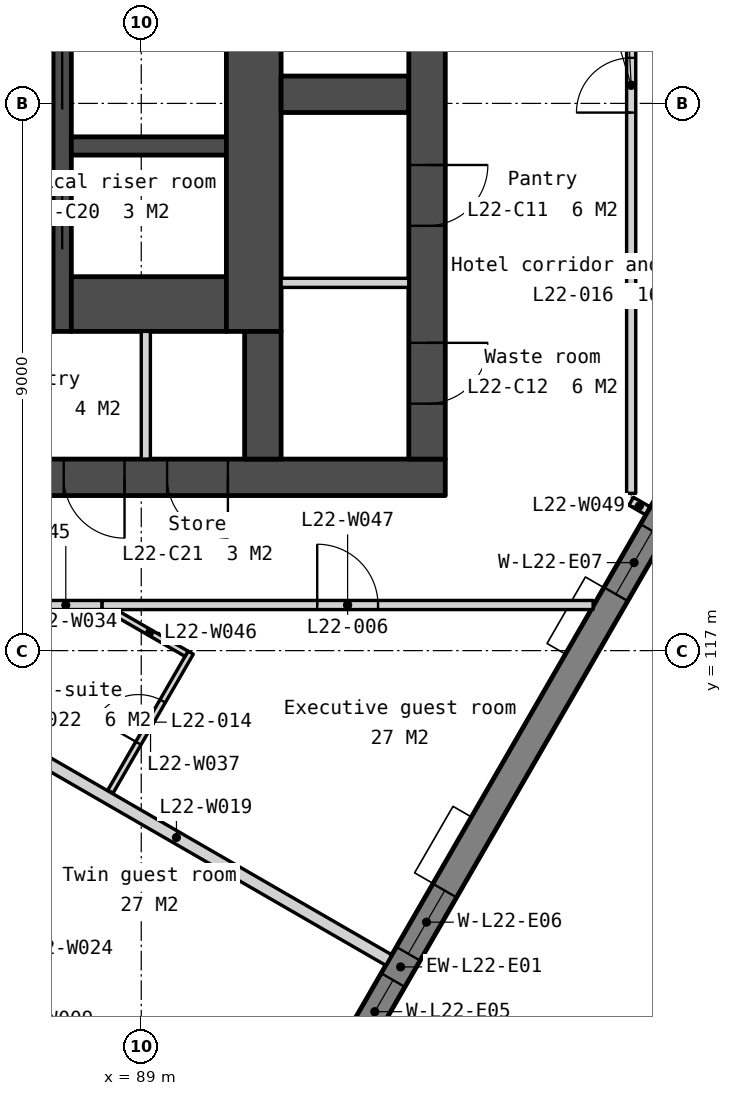
"""IFC4 building model, lengths in metres.
Left out: names, types, materials, properties, quantities, classifications, styles, units other than length and angle.
Written with IfcOpenShell. Run it as: python <this file> out.ifc"""

import sys

from ifc_helpers import new_model, si_unit, direction, frame, frame_2d, origin, place, context, subcontext, project, spatial, polyline, rectangle, outline, extrude, element, fill, save


model = new_model("IFC4")
c1 = context("Model", 3, precision=1e-05, world=origin(), true_north=direction((0.0, 1.0)))
c2 = subcontext(c1, "Body", "Model", "MODEL_VIEW")
j1 = project(units=[si_unit("LENGTHUNIT", "METRE"), si_unit("PLANEANGLEUNIT", "RADIAN")], contexts=[c1])
p1 = place(None, origin())
s1 = spatial("IfcSite", under=j1, at=p1, CompositionType="ELEMENT")
p2 = place(p1, origin())
s2 = spatial("IfcBuilding", under=s1, at=p2, CompositionType="ELEMENT")
p3 = place(p2, frame((0.0, 0.0, 92.3)))
s3 = spatial("IfcBuildingStorey", under=s2, at=p3, CompositionType="ELEMENT", Elevation=92.3)
p4 = place(p3, frame((66.0, 119.85, 0.0), z_axis=(0.0, 0.0, 1.0), x_axis=(1.0, 0.0, 0.0)))
e1 = element("IfcWall", 1, at=p4, inside=s3, PredefinedType="SOLIDWALL", context=c2, shape_type="SweptSolid", body=[
    extrude(rectangle(XDim=28.0, YDim=0.6, at=frame_2d((14.0, 0.0))), origin(), (0.0, 0.0, 1.0), 3.35),
])
p5 = place(p4, frame((6.825, 0.0, 0.0)))
e2 = element("IfcOpeningElement", 2, at=p5, cuts=e1, PredefinedType="OPENING", context=c2, shape_type="SweptSolid", body=[
    extrude(rectangle(XDim=1.8, YDim=2.1, at=frame_2d((0.9, 1.05))), frame((0.0, 0.31, 0.0), z_axis=(0.0, -1.0, 0.0), x_axis=(1.0, 0.0, 0.0)), (0.0, 0.0, 1.0), 0.62),
])
p6 = place(p4, frame((15.85, 0.0, 0.0)))
e3 = element("IfcOpeningElement", 3, at=p6, cuts=e1, PredefinedType="OPENING", context=c2, shape_type="SweptSolid", body=[
    extrude(rectangle(XDim=1.5, YDim=2.1, at=frame_2d((0.75, 1.05))), frame((0.0, 0.31, 0.0), z_axis=(0.0, -1.0, 0.0), x_axis=(1.0, 0.0, 0.0)), (0.0, 0.0, 1.0), 0.62),
])
p7 = place(p4, frame((19.375, 0.0, 0.0)))
e4 = element("IfcOpeningElement", 4, at=p7, cuts=e1, PredefinedType="OPENING", context=c2, shape_type="SweptSolid", body=[
    extrude(rectangle(XDim=1.8, YDim=2.1, at=frame_2d((0.9, 1.05))), frame((0.0, 0.31, 0.0), z_axis=(0.0, -1.0, 0.0), x_axis=(1.0, 0.0, 0.0)), (0.0, 0.0, 1.0), 0.62),
])
p8 = place(p4, frame((4.425, 0.0, 0.0)))
e5 = element("IfcOpeningElement", 5, at=p8, cuts=e1, PredefinedType="OPENING", context=c2, shape_type="SweptSolid", body=[
    extrude(rectangle(XDim=1.0, YDim=2.1, at=frame_2d((0.5, 1.05))), frame((0.0, 0.31, 0.0), z_axis=(0.0, -1.0, 0.0), x_axis=(1.0, 0.0, 0.0)), (0.0, 0.0, 1.0), 0.62),
])
p9 = place(p4, frame((9.925, 0.0, 0.0)))
e6 = element("IfcOpeningElement", 6, at=p9, cuts=e1, PredefinedType="OPENING", context=c2, shape_type="SweptSolid", body=[
    extrude(rectangle(XDim=1.0, YDim=2.1, at=frame_2d((0.5, 1.05))), frame((0.0, 0.31, 0.0), z_axis=(0.0, -1.0, 0.0), x_axis=(1.0, 0.0, 0.0)), (0.0, 0.0, 1.0), 0.62),
])
p10 = place(p4, frame((13.125, 0.0, 0.0)))
e7 = element("IfcOpeningElement", 7, at=p10, cuts=e1, PredefinedType="OPENING", context=c2, shape_type="SweptSolid", body=[
    extrude(rectangle(XDim=1.0, YDim=2.1, at=frame_2d((0.5, 1.05))), frame((0.0, 0.31, 0.0), z_axis=(0.0, -1.0, 0.0), x_axis=(1.0, 0.0, 0.0)), (0.0, 0.0, 1.0), 0.62),
])
p11 = place(p4, frame((21.725, 0.0, 0.0)))
e8 = element("IfcOpeningElement", 8, at=p11, cuts=e1, PredefinedType="OPENING", context=c2, shape_type="SweptSolid", body=[
    extrude(rectangle(XDim=1.0, YDim=2.1, at=frame_2d((0.5, 1.05))), frame((0.0, 0.31, 0.0), z_axis=(0.0, -1.0, 0.0), x_axis=(1.0, 0.0, 0.0)), (0.0, 0.0, 1.0), 0.62),
])
p12 = place(p4, frame((23.425, 0.0, 0.0)))
e9 = element("IfcOpeningElement", 9, at=p12, cuts=e1, PredefinedType="OPENING", context=c2, shape_type="SweptSolid", body=[
    extrude(rectangle(XDim=1.0, YDim=2.1, at=frame_2d((0.5, 1.05))), frame((0.0, 0.31, 0.0), z_axis=(0.0, -1.0, 0.0), x_axis=(1.0, 0.0, 0.0)), (0.0, 0.0, 1.0), 0.62),
])
p13 = place(p3, frame((85.0, 122.7, 0.0), z_axis=(0.0, 0.0, 1.0), x_axis=(1.0, 0.0, 0.0)))
e10 = element("IfcWall", 10, at=p13, inside=s3, PredefinedType="SOLIDWALL", context=c2, shape_type="SweptSolid", body=[
    extrude(rectangle(XDim=2.55, YDim=0.9, at=frame_2d((1.275, 0.0))), origin(), (0.0, 0.0, 1.0), 3.35),
])
p14 = place(p13, frame((0.375, 0.0, 0.0)))
e11 = element("IfcOpeningElement", 11, at=p14, cuts=e10, PredefinedType="OPENING", context=c2, shape_type="SweptSolid", body=[
    extrude(rectangle(XDim=1.8, YDim=2.1, at=frame_2d((0.9, 1.05))), frame((0.0, 0.46, 0.0), z_axis=(0.0, -1.0, 0.0), x_axis=(1.0, 0.0, 0.0)), (0.0, 0.0, 1.0), 0.92),
])
p15 = place(p3, frame((87.7, 133.95, 0.0), z_axis=(0.0, 0.0, 1.0), x_axis=(0.0, -1.0, 0.0)))
e12 = element("IfcWall", 12, at=p15, inside=s3, PredefinedType="SOLIDWALL", context=c2, shape_type="SweptSolid", body=[
    extrude(rectangle(XDim=11.7, YDim=0.3, at=frame_2d((5.85, 0.0))), origin(), (0.0, 0.0, 1.0), 3.35),
])
p16 = place(p15, frame((6.95, 0.0, 0.0)))
e13 = element("IfcOpeningElement", 13, at=p16, cuts=e12, PredefinedType="OPENING", context=c2, shape_type="SweptSolid", body=[
    extrude(rectangle(XDim=1.1, YDim=2.1, at=frame_2d((0.55, 1.05))), frame((0.0, 0.16, 0.0), z_axis=(0.0, -1.0, 0.0), x_axis=(1.0, 0.0, 0.0)), (0.0, 0.0, 1.0), 0.32),
])
p17 = place(p15, frame((5.1, 0.0, 0.0)))
e14 = element("IfcOpeningElement", 14, at=p17, cuts=e12, PredefinedType="OPENING", context=c2, shape_type="SweptSolid", body=[
    extrude(rectangle(XDim=1.0, YDim=2.1, at=frame_2d((0.5, 1.05))), frame((0.0, 0.16, 0.0), z_axis=(0.0, -1.0, 0.0), x_axis=(1.0, 0.0, 0.0)), (0.0, 0.0, 1.0), 0.32),
])
p18 = place(p15, frame((9.25, 0.0, 0.0)))
e15 = element("IfcOpeningElement", 15, at=p18, cuts=e12, PredefinedType="OPENING", context=c2, shape_type="SweptSolid", body=[
    extrude(rectangle(XDim=1.1, YDim=2.1, at=frame_2d((0.55, 1.05))), frame((0.0, 0.16, 0.0), z_axis=(0.0, -1.0, 0.0), x_axis=(1.0, 0.0, 0.0)), (0.0, 0.0, 1.0), 0.32),
])
p19 = place(p3, frame((87.85, 125.3, 0.0), z_axis=(0.0, 0.0, 1.0), x_axis=(1.0, 0.0, 0.0)))
e16 = element("IfcWall", 16, at=p19, inside=s3, PredefinedType="SOLIDWALL", context=c2, shape_type="SweptSolid", body=[
    extrude(rectangle(XDim=2.55, YDim=0.3, at=frame_2d((1.275, 0.0))), origin(), (0.0, 0.0, 1.0), 3.35),
])
p20 = place(p3, frame((87.85, 122.7, 0.0), z_axis=(0.0, 0.0, 1.0), x_axis=(1.0, 0.0, 0.0)))
e17 = element("IfcWall", 17, at=p20, inside=s3, PredefinedType="SOLIDWALL", context=c2, shape_type="SweptSolid", body=[
    extrude(rectangle(XDim=2.55, YDim=0.9, at=frame_2d((1.275, 0.0))), origin(), (0.0, 0.0, 1.0), 3.35),
])
p21 = place(p3, frame((89.075, 122.25, 0.0), z_axis=(0.0, 0.0, 1.0), x_axis=(0.0, -1.0, 0.0)))
e18 = element("IfcWall", 18, at=p21, inside=s3, PredefinedType="PARTITIONING", context=c2, shape_type="SweptSolid", body=[
    extrude(rectangle(XDim=2.1, YDim=0.15, at=frame_2d((1.05, 0.0))), origin(), (0.0, 0.0, 1.0), 3.35),
])
p22 = place(p3, frame((90.85, 133.95, 0.0), z_axis=(0.0, 0.0, 1.0), x_axis=(0.0, -1.0, 0.0)))
e19 = element("IfcWall", 19, at=p22, inside=s3, PredefinedType="SOLIDWALL", context=c2, shape_type="SweptSolid", body=[
    extrude(rectangle(XDim=11.7, YDim=0.9, at=frame_2d((5.85, 0.0))), origin(), (0.0, 0.0, 1.0), 3.35),
])
p23 = place(p3, frame((91.0, 122.25, 0.0), z_axis=(0.0, 0.0, 1.0), x_axis=(0.0, -1.0, 0.0)))
e20 = element("IfcWall", 20, at=p23, inside=s3, PredefinedType="SOLIDWALL", context=c2, shape_type="SweptSolid", body=[
    extrude(rectangle(XDim=2.1, YDim=0.6, at=frame_2d((1.05, 0.0))), origin(), (0.0, 0.0, 1.0), 3.35),
])
p24 = place(p3, frame((91.3, 126.15, 0.0), z_axis=(0.0, 0.0, 1.0), x_axis=(1.0, 0.0, 0.0)))
e21 = element("IfcWall", 21, at=p24, inside=s3, PredefinedType="SOLIDWALL", context=c2, shape_type="SweptSolid", body=[
    extrude(rectangle(XDim=2.1, YDim=0.6, at=frame_2d((1.05, 0.0))), origin(), (0.0, 0.0, 1.0), 3.35),
])
p25 = place(p3, frame((91.3, 123.049, 0.0), z_axis=(0.0, 0.0, 1.0), x_axis=(1.0, 0.0, 0.0)))
e22 = element("IfcWall", 22, at=p25, inside=s3, PredefinedType="PARTITIONING", context=c2, shape_type="SweptSolid", body=[
    extrude(rectangle(XDim=2.1, YDim=0.15, at=frame_2d((1.05, 0.0))), origin(), (0.0, 0.0, 1.0), 3.35),
])
p26 = place(p3, frame((93.7, 133.95, 0.0), z_axis=(0.0, 0.0, 1.0), x_axis=(0.0, -1.0, 0.0)))
e23 = element("IfcWall", 23, at=p26, inside=s3, PredefinedType="SOLIDWALL", context=c2, shape_type="SweptSolid", body=[
    extrude(rectangle(XDim=13.8, YDim=0.6, at=frame_2d((6.9, 0.0))), origin(), (0.0, 0.0, 1.0), 3.35),
])
p27 = place(p26, frame((0.6, 0.0, 0.0)))
e24 = element("IfcOpeningElement", 24, at=p27, cuts=e23, PredefinedType="OPENING", context=c2, shape_type="SweptSolid", body=[
    extrude(rectangle(XDim=1.1, YDim=2.1, at=frame_2d((0.55, 1.05))), frame((0.0, 0.31, 0.0), z_axis=(0.0, -1.0, 0.0), x_axis=(1.0, 0.0, 0.0)), (0.0, 0.0, 1.0), 0.62),
])
p28 = place(p26, frame((8.963, 0.0, 0.0)))
e25 = element("IfcOpeningElement", 25, at=p28, cuts=e23, PredefinedType="OPENING", context=c2, shape_type="SweptSolid", body=[
    extrude(rectangle(XDim=1.0, YDim=2.1, at=frame_2d((0.5, 1.05))), frame((0.0, 0.31, 0.0), z_axis=(0.0, -1.0, 0.0), x_axis=(1.0, 0.0, 0.0)), (0.0, 0.0, 1.0), 0.62),
])
p29 = place(p26, frame((11.888, 0.0, 0.0)))
e26 = element("IfcOpeningElement", 26, at=p29, cuts=e23, PredefinedType="OPENING", context=c2, shape_type="SweptSolid", body=[
    extrude(rectangle(XDim=1.0, YDim=2.1, at=frame_2d((0.5, 1.05))), frame((0.0, 0.31, 0.0), z_axis=(0.0, -1.0, 0.0), x_axis=(1.0, 0.0, 0.0)), (0.0, 0.0, 1.0), 0.62),
])
p30 = place(p3, frame((82.605, 93.333, -0.15), z_axis=(0.0, 0.0, 1.0), x_axis=(0.500000478905, 0.866025127289, 0.0)))
e27 = element("IfcWall", 27, at=p30, inside=s3, PredefinedType="SOLIDWALL", context=c2, shape_type="SweptSolid", body=[
    extrude(outline(polyline([(42.643, 0.0), (42.643, 3.5), (0.0, 3.5), (0.0, 0.0), (42.643, 0.0)])), frame((0.0, 0.225, 0.0), z_axis=(0.0, -1.0, 0.0), x_axis=(1.0, 0.0, 0.0)), (0.0, 0.0, 1.0), 0.45),
])
p31 = place(p30, frame((2.814, 0.0, 1.05)))
e28 = element("IfcOpeningElement", 28, at=p31, cuts=e27, PredefinedType="OPENING", context=c2, shape_type="SweptSolid", body=[
    extrude(rectangle(XDim=1.2, YDim=1.5, at=frame_2d((0.6, 0.75))), frame((0.0, 0.235, 0.0), z_axis=(0.0, -1.0, 0.0), x_axis=(1.0, 0.0, 0.0)), (0.0, 0.0, 1.0), 0.47),
])
p32 = place(p30, frame((4.514, 0.0, 1.05)))
e29 = element("IfcOpeningElement", 29, at=p32, cuts=e27, PredefinedType="OPENING", context=c2, shape_type="SweptSolid", body=[
    extrude(rectangle(XDim=1.2, YDim=1.5, at=frame_2d((0.6, 0.75))), frame((0.0, 0.235, 0.0), z_axis=(0.0, -1.0, 0.0), x_axis=(1.0, 0.0, 0.0)), (0.0, 0.0, 1.0), 0.47),
])
p33 = place(p30, frame((11.343, 0.0, 1.05)))
e30 = element("IfcOpeningElement", 30, at=p33, cuts=e27, PredefinedType="OPENING", context=c2, shape_type="SweptSolid", body=[
    extrude(rectangle(XDim=1.2, YDim=1.5, at=frame_2d((0.6, 0.75))), frame((0.0, 0.235, 0.0), z_axis=(0.0, -1.0, 0.0), x_axis=(1.0, 0.0, 0.0)), (0.0, 0.0, 1.0), 0.47),
])
p34 = place(p30, frame((13.043, 0.0, 1.05)))
e31 = element("IfcOpeningElement", 31, at=p34, cuts=e27, PredefinedType="OPENING", context=c2, shape_type="SweptSolid", body=[
    extrude(rectangle(XDim=1.2, YDim=1.5, at=frame_2d((0.6, 0.75))), frame((0.0, 0.235, 0.0), z_axis=(0.0, -1.0, 0.0), x_axis=(1.0, 0.0, 0.0)), (0.0, 0.0, 1.0), 0.47),
])
p35 = place(p30, frame((19.872, 0.0, 1.05)))
e32 = element("IfcOpeningElement", 32, at=p35, cuts=e27, PredefinedType="OPENING", context=c2, shape_type="SweptSolid", body=[
    extrude(rectangle(XDim=1.2, YDim=1.5, at=frame_2d((0.6, 0.75))), frame((0.0, 0.235, 0.0), z_axis=(0.0, -1.0, 0.0), x_axis=(1.0, 0.0, 0.0)), (0.0, 0.0, 1.0), 0.47),
])
p36 = place(p30, frame((21.572, 0.0, 1.05)))
e33 = element("IfcOpeningElement", 33, at=p36, cuts=e27, PredefinedType="OPENING", context=c2, shape_type="SweptSolid", body=[
    extrude(rectangle(XDim=1.2, YDim=1.5, at=frame_2d((0.6, 0.75))), frame((0.0, 0.235, 0.0), z_axis=(0.0, -1.0, 0.0), x_axis=(1.0, 0.0, 0.0)), (0.0, 0.0, 1.0), 0.47),
])
p37 = place(p30, frame((28.4, 0.0, 1.05)))
e34 = element("IfcOpeningElement", 34, at=p37, cuts=e27, PredefinedType="OPENING", context=c2, shape_type="SweptSolid", body=[
    extrude(rectangle(XDim=1.2, YDim=1.5, at=frame_2d((0.6, 0.75))), frame((0.0, 0.235, 0.0), z_axis=(0.0, -1.0, 0.0), x_axis=(1.0, 0.0, 0.0)), (0.0, 0.0, 1.0), 0.47),
])
p38 = place(p30, frame((30.1, 0.0, 1.05)))
e35 = element("IfcOpeningElement", 35, at=p38, cuts=e27, PredefinedType="OPENING", context=c2, shape_type="SweptSolid", body=[
    extrude(rectangle(XDim=1.2, YDim=1.5, at=frame_2d((0.6, 0.75))), frame((0.0, 0.235, 0.0), z_axis=(0.0, -1.0, 0.0), x_axis=(1.0, 0.0, 0.0)), (0.0, 0.0, 1.0), 0.47),
])
p39 = place(p30, frame((36.929, 0.0, 1.05)))
e36 = element("IfcOpeningElement", 36, at=p39, cuts=e27, PredefinedType="OPENING", context=c2, shape_type="SweptSolid", body=[
    extrude(rectangle(XDim=1.2, YDim=1.5, at=frame_2d((0.6, 0.75))), frame((0.0, 0.235, 0.0), z_axis=(0.0, -1.0, 0.0), x_axis=(1.0, 0.0, 0.0)), (0.0, 0.0, 1.0), 0.47),
])
p40 = place(p30, frame((38.629, 0.0, 1.05)))
e37 = element("IfcOpeningElement", 37, at=p40, cuts=e27, PredefinedType="OPENING", context=c2, shape_type="SweptSolid", body=[
    extrude(rectangle(XDim=1.2, YDim=1.5, at=frame_2d((0.6, 0.75))), frame((0.0, 0.235, 0.0), z_axis=(0.0, -1.0, 0.0), x_axis=(1.0, 0.0, 0.0)), (0.0, 0.0, 1.0), 0.47),
])
p41 = place(p3, frame((83.954, 112.25, 0.0), z_axis=(0.0, 0.0, 1.0), x_axis=(0.866030828432, -0.499990604118, 0.0)))
e38 = element("IfcWall", 38, at=p41, inside=s3, PredefinedType="PARTITIONING", context=c2, shape_type="SweptSolid", body=[
    extrude(rectangle(XDim=8.065, YDim=0.2, at=frame_2d((4.033, 0.0))), origin(), (0.0, 0.0, 1.0), 3.35),
])
p42 = place(p3, frame((86.087, 115.943, 0.0), z_axis=(0.0, 0.0, 1.0), x_axis=(0.866010152247, -0.500026415507, 0.0)))
e39 = element("IfcWall", 39, at=p42, inside=s3, PredefinedType="PARTITIONING", context=c2, shape_type="SweptSolid", body=[
    extrude(rectangle(XDim=8.065, YDim=0.2, at=frame_2d((4.032, 0.0))), origin(), (0.0, 0.0, 1.0), 3.35),
])
p43 = place(p3, frame((88.493, 114.68, 0.0), z_axis=(0.0, 0.0, 1.0), x_axis=(0.499938597367, 0.866060851709, 0.0)))
e40 = element("IfcWall", 40, at=p43, inside=s3, PredefinedType="PARTITIONING", context=c2, shape_type="SweptSolid", body=[
    extrude(rectangle(XDim=2.64, YDim=0.1, at=frame_2d((1.32, 0.0))), origin(), (0.0, 0.0, 1.0), 3.35),
])
p44 = place(p43, frame((0.92, 0.0, 0.0)))
e41 = element("IfcOpeningElement", 41, at=p44, cuts=e40, PredefinedType="OPENING", context=c2, shape_type="SweptSolid", body=[
    extrude(rectangle(XDim=0.8, YDim=2.1, at=frame_2d((0.4, 1.05))), frame((0.0, 0.06, 0.0), z_axis=(0.0, -1.0, 0.0), x_axis=(1.0, 0.0, 0.0)), (0.0, 0.0, 1.0), 0.12),
])
p45 = place(p3, frame((87.162, 117.75, 0.0), z_axis=(0.0, 0.0, 1.0), x_axis=(1.0, 0.0, 0.0)))
e42 = element("IfcWall", 42, at=p45, inside=s3, PredefinedType="PARTITIONING", context=c2, shape_type="SweptSolid", body=[
    extrude(rectangle(XDim=1.195, YDim=0.15, at=frame_2d((0.597, 0.0))), origin(), (0.0, 0.0, 1.0), 3.35),
])
p46 = place(p3, frame((88.534, 117.647, 0.0), z_axis=(0.0, 0.0, 1.0), x_axis=(0.866031452229, -0.49998952364, 0.0)))
e43 = element("IfcWall", 43, at=p46, inside=s3, PredefinedType="PARTITIONING", context=c2, shape_type="SweptSolid", body=[
    extrude(rectangle(XDim=1.398, YDim=0.1, at=frame_2d((0.699, 0.0))), origin(), (0.0, 0.0, 1.0), 3.35),
])
p47 = place(p3, frame((88.356, 117.75, 0.0), z_axis=(0.0, 0.0, 1.0), x_axis=(1.0, 0.0, 0.0)))
e44 = element("IfcWall", 44, at=p47, inside=s3, PredefinedType="PARTITIONING", context=c2, shape_type="SweptSolid", body=[
    extrude(rectangle(XDim=8.075, YDim=0.15, at=frame_2d((4.037, 0.0))), origin(), (0.0, 0.0, 1.0), 3.35),
])
p48 = place(p47, frame((3.537, 0.0, 0.0)))
e45 = element("IfcOpeningElement", 45, at=p48, cuts=e44, PredefinedType="OPENING", context=c2, shape_type="SweptSolid", body=[
    extrude(rectangle(XDim=1.0, YDim=2.1, at=frame_2d((0.5, 1.05))), frame((0.0, 0.085, 0.0), z_axis=(0.0, -1.0, 0.0), x_axis=(1.0, 0.0, 0.0)), (0.0, 0.0, 1.0), 0.17),
])
p49 = place(p3, frame((97.057, 119.457, 0.0), z_axis=(0.0, 0.0, 1.0), x_axis=(0.866159461733, -0.499767732902, 0.0)))
e46 = element("IfcWall", 46, at=p49, inside=s3, PredefinedType="PARTITIONING", context=c2, shape_type="SweptSolid", body=[
    extrude(rectangle(XDim=0.311, YDim=0.15, at=frame_2d((0.156, 0.0))), origin(), (0.0, 0.0, 1.0), 3.35),
])
p50 = place(p3, frame((97.057, 119.587, 0.0), z_axis=(0.0, 0.0, 1.0), x_axis=(0.0, 1.0, 0.0)))
e47 = element("IfcWall", 47, at=p50, inside=s3, PredefinedType="PARTITIONING", context=c2, shape_type="SweptSolid", body=[
    extrude(rectangle(XDim=13.424, YDim=0.15, at=frame_2d((6.712, 0.0))), origin(), (0.0, 0.0, 1.0), 3.35),
])
p51 = place(p50, frame((6.262, 0.0, 0.0)))
e48 = element("IfcOpeningElement", 48, at=p51, cuts=e47, PredefinedType="OPENING", context=c2, shape_type="SweptSolid", body=[
    extrude(rectangle(XDim=0.9, YDim=2.1, at=frame_2d((0.45, 1.05))), frame((0.0, 0.085, 0.0), z_axis=(0.0, -1.0, 0.0), x_axis=(1.0, 0.0, 0.0)), (0.0, 0.0, 1.0), 0.17),
])
p52 = place(p28, origin())
e49 = element("IfcDoor", 49, at=p52, inside=s3, OperationType="SINGLE_SWING_LEFT", PredefinedType="DOOR", context=c2, shape_type="SweptSolid", body=[
    extrude(rectangle(XDim=1.0, YDim=2.1, at=frame_2d((0.5, 1.05))), frame((0.0, 0.025, 0.0), z_axis=(0.0, -1.0, 0.0), x_axis=(1.0, 0.0, 0.0)), (0.0, 0.0, 1.0), 0.05),
])
fill(e25, e49)
p53 = place(p29, origin())
e50 = element("IfcDoor", 50, at=p53, inside=s3, OperationType="SINGLE_SWING_LEFT", PredefinedType="DOOR", context=c2, shape_type="SweptSolid", body=[
    extrude(rectangle(XDim=1.0, YDim=2.1, at=frame_2d((0.5, 1.05))), frame((0.0, 0.025, 0.0), z_axis=(0.0, -1.0, 0.0), x_axis=(1.0, 0.0, 0.0)), (0.0, 0.0, 1.0), 0.05),
])
fill(e26, e50)
p54 = place(p16, origin())
e51 = element("IfcDoor", 51, at=p54, inside=s3, OperationType="SLIDING_TO_LEFT", PredefinedType="DOOR", context=c2, shape_type="SweptSolid", body=[
    extrude(rectangle(XDim=1.1, YDim=2.1, at=frame_2d((0.55, 1.05))), frame((0.0, 0.025, 0.0), z_axis=(0.0, -1.0, 0.0), x_axis=(1.0, 0.0, 0.0)), (0.0, 0.0, 1.0), 0.05),
])
fill(e13, e51)
p55 = place(p11, origin())
e52 = element("IfcDoor", 52, at=p55, inside=s3, OperationType="SINGLE_SWING_RIGHT", PredefinedType="DOOR", context=c2, shape_type="SweptSolid", body=[
    extrude(rectangle(XDim=1.0, YDim=2.1, at=frame_2d((0.5, 1.05))), frame((0.0, 0.025, 0.0), z_axis=(0.0, -1.0, 0.0), x_axis=(1.0, 0.0, 0.0)), (0.0, 0.0, 1.0), 0.05),
])
fill(e8, e52)
p56 = place(p12, origin())
e53 = element("IfcDoor", 53, at=p56, inside=s3, OperationType="SINGLE_SWING_RIGHT", PredefinedType="DOOR", context=c2, shape_type="SweptSolid", body=[
    extrude(rectangle(XDim=1.0, YDim=2.1, at=frame_2d((0.5, 1.05))), frame((0.0, 0.025, 0.0), z_axis=(0.0, -1.0, 0.0), x_axis=(1.0, 0.0, 0.0)), (0.0, 0.0, 1.0), 0.05),
])
fill(e9, e53)
p57 = place(p18, origin())
e54 = element("IfcDoor", 54, at=p57, inside=s3, OperationType="SLIDING_TO_LEFT", PredefinedType="DOOR", context=c2, shape_type="SweptSolid", body=[
    extrude(rectangle(XDim=1.1, YDim=2.1, at=frame_2d((0.55, 1.05))), frame((0.0, 0.025, 0.0), z_axis=(0.0, -1.0, 0.0), x_axis=(1.0, 0.0, 0.0)), (0.0, 0.0, 1.0), 0.05),
])
fill(e15, e54)
p58 = place(p35, origin())
e55 = element("IfcWindow", 55, at=p58, inside=s3, PartitioningType="SINGLE_PANEL", PredefinedType="WINDOW", context=c2, shape_type="SweptSolid", body=[
    extrude(rectangle(XDim=1.2, YDim=1.5, at=frame_2d((0.6, 0.75))), frame((0.0, 0.03, 0.0), z_axis=(0.0, -1.0, 0.0), x_axis=(1.0, 0.0, 0.0)), (0.0, 0.0, 1.0), 0.06),
])
fill(e32, e55)
p59 = place(p36, origin())
e56 = element("IfcWindow", 56, at=p59, inside=s3, PartitioningType="SINGLE_PANEL", PredefinedType="WINDOW", context=c2, shape_type="SweptSolid", body=[
    extrude(rectangle(XDim=1.2, YDim=1.5, at=frame_2d((0.6, 0.75))), frame((0.0, 0.03, 0.0), z_axis=(0.0, -1.0, 0.0), x_axis=(1.0, 0.0, 0.0)), (0.0, 0.0, 1.0), 0.06),
])
fill(e33, e56)
p60 = place(p37, origin())
e57 = element("IfcWindow", 57, at=p60, inside=s3, PartitioningType="SINGLE_PANEL", PredefinedType="WINDOW", context=c2, shape_type="SweptSolid", body=[
    extrude(rectangle(XDim=1.2, YDim=1.5, at=frame_2d((0.6, 0.75))), frame((0.0, 0.03, 0.0), z_axis=(0.0, -1.0, 0.0), x_axis=(1.0, 0.0, 0.0)), (0.0, 0.0, 1.0), 0.06),
])
fill(e34, e57)
p61 = place(p48, origin())
e58 = element("IfcDoor", 58, at=p61, inside=s3, OperationType="SINGLE_SWING_LEFT", PredefinedType="DOOR", context=c2, shape_type="SweptSolid", body=[
    extrude(rectangle(XDim=1.0, YDim=2.1, at=frame_2d((0.5, 1.05))), frame((0.0, 0.025, 0.0), z_axis=(0.0, -1.0, 0.0), x_axis=(1.0, 0.0, 0.0)), (0.0, 0.0, 1.0), 0.05),
])
fill(e45, e58)
p62 = place(p51, origin())
e59 = element("IfcDoor", 59, at=p62, inside=s3, OperationType="SINGLE_SWING_LEFT", PredefinedType="DOOR", context=c2, shape_type="SweptSolid", body=[
    extrude(rectangle(XDim=0.9, YDim=2.1, at=frame_2d((0.45, 1.05))), frame((0.0, 0.025, 0.0), z_axis=(0.0, -1.0, 0.0), x_axis=(1.0, 0.0, 0.0)), (0.0, 0.0, 1.0), 0.05),
])
fill(e48, e59)
p63 = place(p44, origin())
e60 = element("IfcDoor", 60, at=p63, inside=s3, OperationType="SINGLE_SWING_LEFT", PredefinedType="DOOR", context=c2, shape_type="SweptSolid", body=[
    extrude(rectangle(XDim=0.8, YDim=2.1, at=frame_2d((0.4, 1.05))), frame((0.0, 0.025, 0.0), z_axis=(0.0, -1.0, 0.0), x_axis=(1.0, 0.0, 0.0)), (0.0, 0.0, 1.0), 0.05),
])
fill(e41, e60)
save(model, sys.argv[1])
